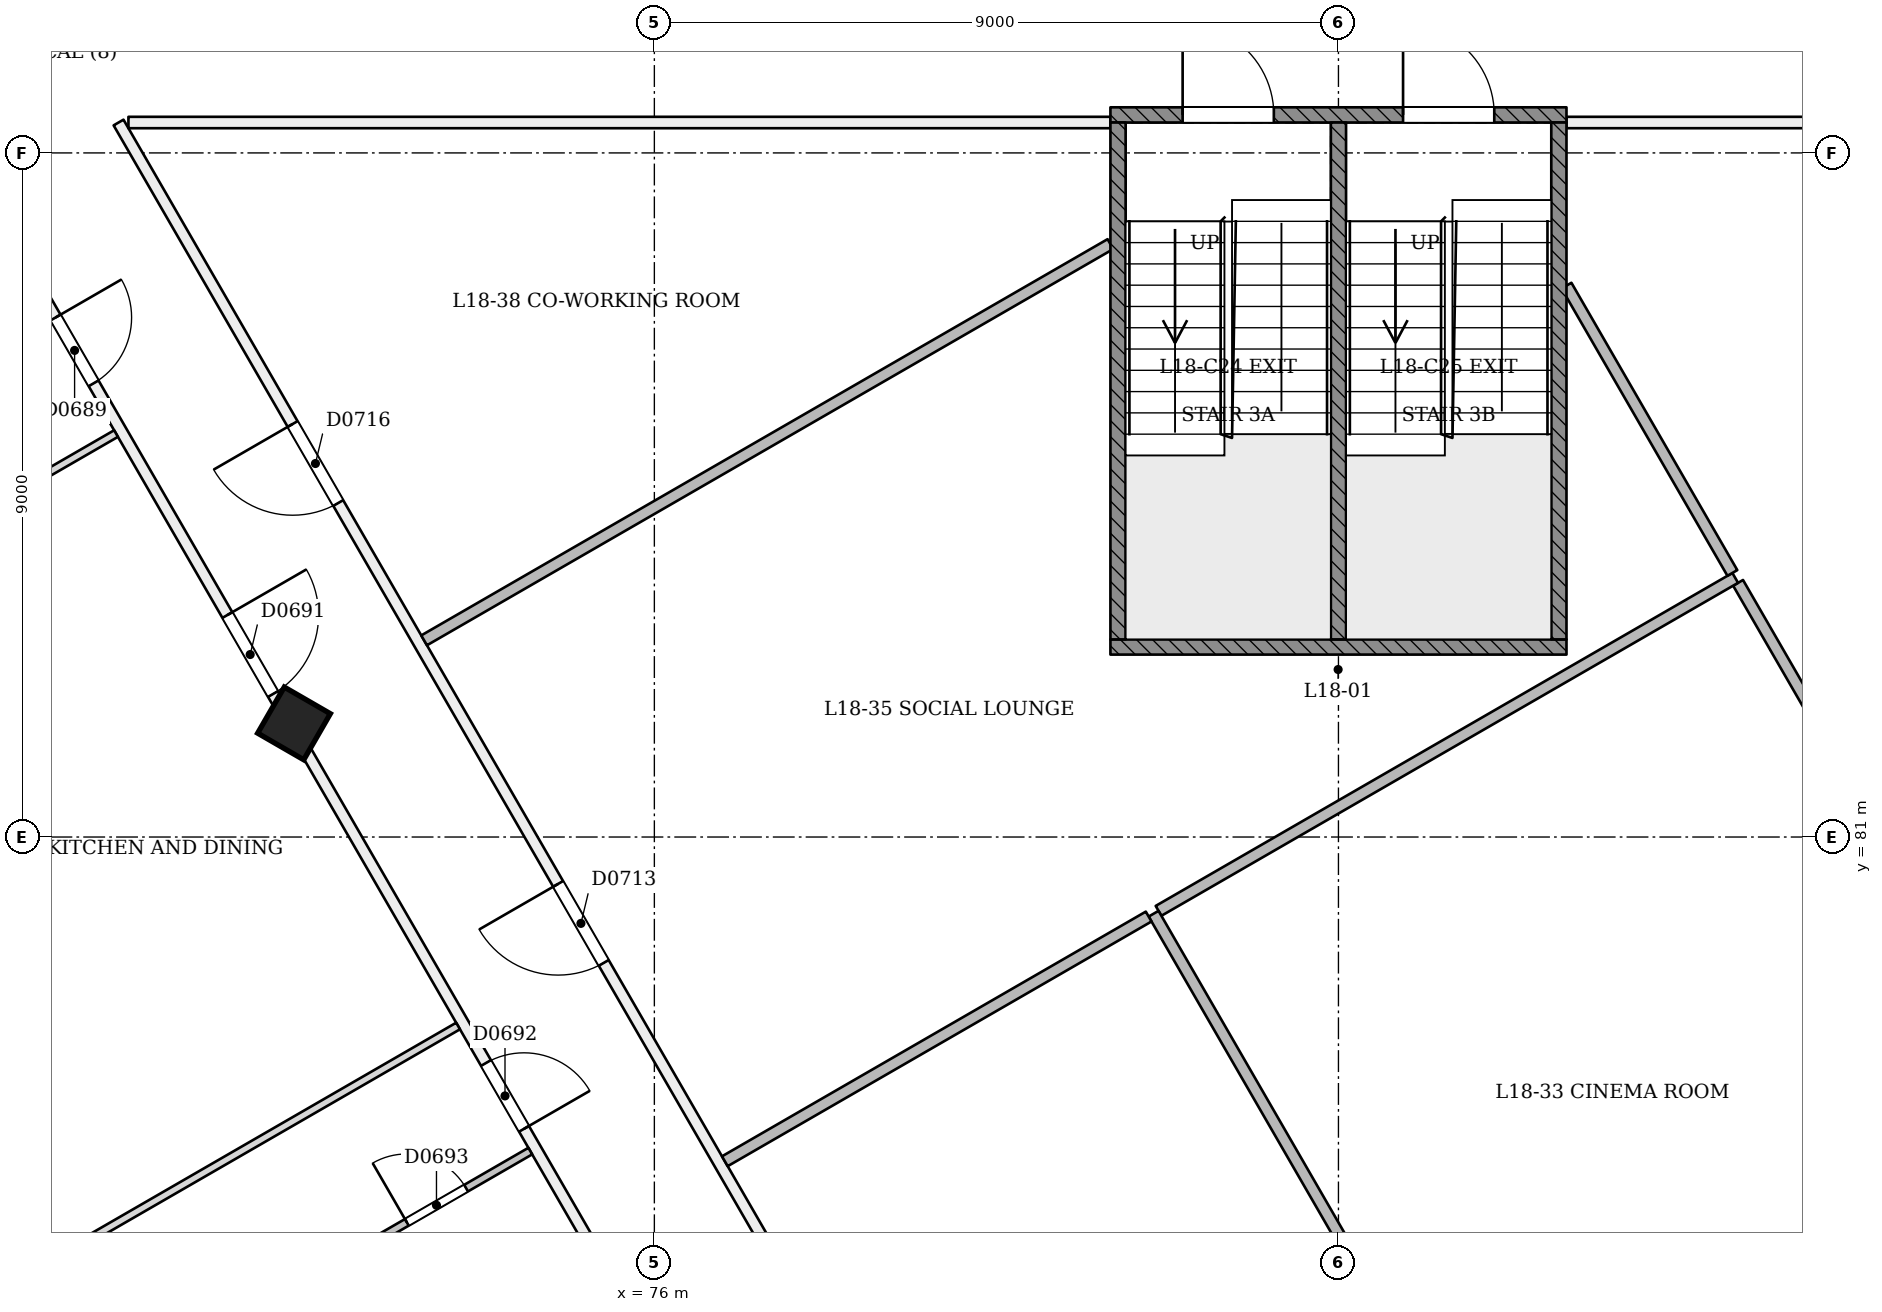
"""IFC4 building model, lengths in metres.
Left out: names, types, materials, properties, quantities, classifications, styles, units other than length and angle.
Written with IfcOpenShell. Run it as: python <this file> out.ifc"""

import sys

from ifc_helpers import new_model, si_unit, direction, frame, frame_2d, origin, origin_2d, place, context, subcontext, project, spatial, rectangle, extrude, element, fill, save


model = new_model("IFC4")
c1 = context("Model", 3, precision=1e-05, world=origin(), true_north=direction((0.0, 1.0)))
c2 = subcontext(c1, "Body", "Model", "MODEL_VIEW")
j1 = project(units=[si_unit("LENGTHUNIT", "METRE"), si_unit("PLANEANGLEUNIT", "RADIAN")], contexts=[c1])
p1 = place(None, origin())
s1 = spatial("IfcSite", under=j1, at=p1, CompositionType="ELEMENT")
p2 = place(p1, origin())
s2 = spatial("IfcBuilding", under=s1, at=p2, CompositionType="ELEMENT")
p3 = place(p2, frame((0.0, 0.0, 73.8)))
s3 = spatial("IfcBuildingStorey", under=s2, at=p3, CompositionType="ELEMENT", Elevation=73.8)
p4 = place(p3, frame((71.232, 82.448, -0.021), z_axis=(0.022222910879, 0.038415824599, 0.999014697916), x_axis=(-0.866021331072, -0.498527657424, 0.038434735731)))
e1 = element("IfcColumn", 1, at=p4, inside=s3, PredefinedType="COLUMN", context=c2, shape_type="SweptSolid", body=[
    extrude(rectangle(XDim=0.7, YDim=0.7, at=origin_2d()), origin(), (0.0, 0.0, 1.0), 3.604),
])
p5 = place(p3, frame((66.732, 90.242, 0.0), z_axis=(0.0, 0.0, 1.0), x_axis=(0.500004906105, -0.866022571225, 0.0)))
e2 = element("IfcWall", 2, at=p5, inside=s3, PredefinedType="PARTITIONING", context=c2, shape_type="SweptSolid", body=[
    extrude(rectangle(XDim=35.041, YDim=0.15, at=frame_2d((17.521, 0.0))), origin(), (0.0, 0.0, 1.0), 2.7),
])
p6 = place(p5, frame((2.78, 0.0, 0.0)))
e3 = element("IfcOpeningElement", 3, at=p6, cuts=e2, PredefinedType="OPENING", context=c2, shape_type="SweptSolid", body=[
    extrude(rectangle(XDim=1.0, YDim=2.1, at=frame_2d((0.5, 1.05))), frame((0.0, 0.085, 0.0), z_axis=(0.0, -1.0, 0.0), x_axis=(1.0, 0.0, 0.0)), (0.0, 0.0, 1.0), 0.171),
])
p7 = place(p5, frame((7.3, 0.0, 0.0)))
e4 = element("IfcOpeningElement", 4, at=p7, cuts=e2, PredefinedType="OPENING", context=c2, shape_type="SweptSolid", body=[
    extrude(rectangle(XDim=1.2, YDim=2.1, at=frame_2d((0.6, 1.05))), frame((0.0, 0.085, 0.0), z_axis=(0.0, -1.0, 0.0), x_axis=(1.0, 0.0, 0.0)), (0.0, 0.0, 1.0), 0.171),
])
p8 = place(p5, frame((14.105, 0.0, 0.0)))
e5 = element("IfcOpeningElement", 5, at=p8, cuts=e2, PredefinedType="OPENING", context=c2, shape_type="SweptSolid", body=[
    extrude(rectangle(XDim=1.0, YDim=2.1, at=frame_2d((0.5, 1.05))), frame((0.0, 0.085, 0.0), z_axis=(0.0, -1.0, 0.0), x_axis=(1.0, 0.0, 0.0)), (0.0, 0.0, 1.0), 0.171),
])
p9 = place(p5, frame((20.78, 0.0, 0.0)))
e6 = element("IfcOpeningElement", 6, at=p9, cuts=e2, PredefinedType="OPENING", context=c2, shape_type="SweptSolid", body=[
    extrude(rectangle(XDim=1.0, YDim=2.1, at=frame_2d((0.5, 1.05))), frame((0.0, 0.085, 0.0), z_axis=(0.0, -1.0, 0.0), x_axis=(1.0, 0.0, 0.0)), (0.0, 0.0, 1.0), 0.171),
])
p10 = place(p5, frame((24.25, 0.0, 0.0)))
e7 = element("IfcOpeningElement", 7, at=p10, cuts=e2, PredefinedType="OPENING", context=c2, shape_type="SweptSolid", body=[
    extrude(rectangle(XDim=1.0, YDim=2.1, at=frame_2d((0.5, 1.05))), frame((0.0, 0.085, 0.0), z_axis=(0.0, -1.0, 0.0), x_axis=(1.0, 0.0, 0.0)), (0.0, 0.0, 1.0), 0.171),
])
p11 = place(p5, frame((30.473, 0.0, 0.0)))
e8 = element("IfcOpeningElement", 8, at=p11, cuts=e2, PredefinedType="OPENING", context=c2, shape_type="SweptSolid", body=[
    extrude(rectangle(XDim=1.2, YDim=2.1, at=frame_2d((0.6, 1.05))), frame((0.0, 0.085, 0.0), z_axis=(0.0, -1.0, 0.0), x_axis=(1.0, 0.0, 0.0)), (0.0, 0.0, 1.0), 0.171),
])
p12 = place(p3, frame((85.747, 59.896, 0.0), z_axis=(0.0, 0.0, 1.0), x_axis=(0.500002549277, 0.866023931954, 0.0)))
e9 = element("IfcWall", 9, at=p12, inside=s3, PredefinedType="PARTITIONING", context=c2, shape_type="SweptSolid", body=[
    extrude(rectangle(XDim=43.082, YDim=0.15, at=frame_2d((21.541, 0.0))), origin(), (0.0, 0.0, 1.0), 2.7),
])
p13 = place(p12, frame((0.244, 0.0, 0.0)))
e10 = element("IfcOpeningElement", 10, at=p13, cuts=e9, PredefinedType="OPENING", context=c2, shape_type="SweptSolid", body=[
    extrude(rectangle(XDim=1.2, YDim=2.1, at=frame_2d((0.6, 1.05))), frame((0.0, 0.085, 0.0), z_axis=(0.0, -1.0, 0.0), x_axis=(1.0, 0.0, 0.0)), (0.0, 0.0, 1.0), 0.171),
])
p14 = place(p12, frame((4.146, 0.0, 0.0)))
e11 = element("IfcOpeningElement", 11, at=p14, cuts=e9, PredefinedType="OPENING", context=c2, shape_type="SweptSolid", body=[
    extrude(rectangle(XDim=1.0, YDim=2.1, at=frame_2d((0.5, 1.05))), frame((0.0, 0.085, 0.0), z_axis=(0.0, -1.0, 0.0), x_axis=(1.0, 0.0, 0.0)), (0.0, 0.0, 1.0), 0.171),
])
p15 = place(p12, frame((10.821, 0.0, 0.0)))
e12 = element("IfcOpeningElement", 12, at=p15, cuts=e9, PredefinedType="OPENING", context=c2, shape_type="SweptSolid", body=[
    extrude(rectangle(XDim=1.0, YDim=2.1, at=frame_2d((0.5, 1.05))), frame((0.0, 0.085, 0.0), z_axis=(0.0, -1.0, 0.0), x_axis=(1.0, 0.0, 0.0)), (0.0, 0.0, 1.0), 0.171),
])
p16 = place(p12, frame((13.262, 0.0, 0.0)))
e13 = element("IfcOpeningElement", 13, at=p16, cuts=e9, PredefinedType="OPENING", context=c2, shape_type="SweptSolid", body=[
    extrude(rectangle(XDim=1.0, YDim=2.1, at=frame_2d((0.5, 1.05))), frame((0.0, 0.085, 0.0), z_axis=(0.0, -1.0, 0.0), x_axis=(1.0, 0.0, 0.0)), (0.0, 0.0, 1.0), 0.171),
])
p17 = place(p12, frame((20.941, 0.0, 0.0)))
e14 = element("IfcOpeningElement", 14, at=p17, cuts=e9, PredefinedType="OPENING", context=c2, shape_type="SweptSolid", body=[
    extrude(rectangle(XDim=1.2, YDim=2.1, at=frame_2d((0.6, 1.05))), frame((0.0, 0.085, 0.0), z_axis=(0.0, -1.0, 0.0), x_axis=(1.0, 0.0, 0.0)), (0.0, 0.0, 1.0), 0.171),
])
p18 = place(p12, frame((28.821, 0.0, 0.0)))
e15 = element("IfcOpeningElement", 15, at=p18, cuts=e9, PredefinedType="OPENING", context=c2, shape_type="SweptSolid", body=[
    extrude(rectangle(XDim=1.0, YDim=2.1, at=frame_2d((0.5, 1.05))), frame((0.0, 0.085, 0.0), z_axis=(0.0, -1.0, 0.0), x_axis=(1.0, 0.0, 0.0)), (0.0, 0.0, 1.0), 0.171),
])
p19 = place(p12, frame((31.112, 0.0, 0.0)))
e16 = element("IfcOpeningElement", 16, at=p19, cuts=e9, PredefinedType="OPENING", context=c2, shape_type="SweptSolid", body=[
    extrude(rectangle(XDim=1.1, YDim=2.1, at=frame_2d((0.55, 1.05))), frame((0.0, 0.085, 0.0), z_axis=(0.0, -1.0, 0.0), x_axis=(1.0, 0.0, 0.0)), (0.0, 0.0, 1.0), 0.171),
])
p20 = place(p12, frame((38.514, 0.0, 0.0)))
e17 = element("IfcOpeningElement", 17, at=p20, cuts=e9, PredefinedType="OPENING", context=c2, shape_type="SweptSolid", body=[
    extrude(rectangle(XDim=1.2, YDim=2.1, at=frame_2d((0.6, 1.05))), frame((0.0, 0.085, 0.0), z_axis=(0.0, -1.0, 0.0), x_axis=(1.0, 0.0, 0.0)), (0.0, 0.0, 1.0), 0.171),
])
p21 = place(p3, frame((101.049, 90.4, 0.0), z_axis=(0.0, 0.0, 1.0), x_axis=(-0.500000325473, -0.866025215872, 0.0)))
e18 = element("IfcWall", 18, at=p21, inside=s3, PredefinedType="PARTITIONING", context=c2, shape_type="SweptSolid", body=[
    extrude(rectangle(XDim=31.968, YDim=0.15, at=frame_2d((15.984, 0.0))), origin(), (0.0, 0.0, 1.0), 3.1),
])
p22 = place(p21, frame((16.691, 0.0, 0.0)))
e19 = element("IfcOpeningElement", 19, at=p22, cuts=e18, PredefinedType="OPENING", context=c2, shape_type="SweptSolid", body=[
    extrude(rectangle(XDim=1.2, YDim=2.1, at=frame_2d((0.6, 1.05))), frame((0.0, 0.085, 0.0), z_axis=(0.0, -1.0, 0.0), x_axis=(1.0, 0.0, 0.0)), (0.0, 0.0, 1.0), 0.171),
])
p23 = place(p21, frame((6.541, 0.0, 0.0)))
e20 = element("IfcOpeningElement", 20, at=p23, cuts=e18, PredefinedType="OPENING", context=c2, shape_type="SweptSolid", body=[
    extrude(rectangle(XDim=1.2, YDim=2.1, at=frame_2d((0.6, 1.05))), frame((0.0, 0.085, 0.0), z_axis=(0.0, -1.0, 0.0), x_axis=(1.0, 0.0, 0.0)), (0.0, 0.0, 1.0), 0.171),
])
p24 = place(p3, frame((88.0, 90.4, 0.0), z_axis=(0.0, 0.0, 1.0), x_axis=(1.0, 0.0, 0.0)))
e21 = element("IfcWall", 21, at=p24, inside=s3, PredefinedType="PARTITIONING", context=c2, shape_type="SweptSolid", body=[
    extrude(rectangle(XDim=12.919, YDim=0.15, at=frame_2d((6.459, 0.0))), origin(), (0.0, 0.0, 1.0), 3.1),
])
p25 = place(p3, frame((85.0, 62.602, 0.0), z_axis=(0.0, 0.0, 1.0), x_axis=(-0.500002713669, 0.866023837041, 0.0)))
e22 = element("IfcWall", 22, at=p25, inside=s3, PredefinedType="PARTITIONING", context=c2, shape_type="SweptSolid", body=[
    extrude(rectangle(XDim=32.098, YDim=0.15, at=frame_2d((16.049, 0.0))), origin(), (0.0, 0.0, 1.0), 3.1),
])
p26 = place(p25, frame((19.332, 0.0, 0.0)))
e23 = element("IfcOpeningElement", 23, at=p26, cuts=e22, PredefinedType="OPENING", context=c2, shape_type="SweptSolid", body=[
    extrude(rectangle(XDim=1.2, YDim=2.1, at=frame_2d((0.6, 1.05))), frame((0.0, 0.085, 0.0), z_axis=(0.0, -1.0, 0.0), x_axis=(1.0, 0.0, 0.0)), (0.0, 0.0, 1.0), 0.171),
])
p27 = place(p25, frame((10.898, 0.0, 0.0)))
e24 = element("IfcOpeningElement", 24, at=p27, cuts=e22, PredefinedType="OPENING", context=c2, shape_type="SweptSolid", body=[
    extrude(rectangle(XDim=1.2, YDim=2.1, at=frame_2d((0.6, 1.05))), frame((0.0, 0.085, 0.0), z_axis=(0.0, -1.0, 0.0), x_axis=(1.0, 0.0, 0.0)), (0.0, 0.0, 1.0), 0.171),
])
p28 = place(p25, frame((26.318, 0.0, 0.0)))
e25 = element("IfcOpeningElement", 25, at=p28, cuts=e22, PredefinedType="OPENING", context=c2, shape_type="SweptSolid", body=[
    extrude(rectangle(XDim=1.2, YDim=2.1, at=frame_2d((0.6, 1.05))), frame((0.0, 0.085, 0.0), z_axis=(0.0, -1.0, 0.0), x_axis=(1.0, 0.0, 0.0)), (0.0, 0.0, 1.0), 0.171),
])
p29 = place(p25, frame((3.686, 0.0, 0.0)))
e26 = element("IfcOpeningElement", 26, at=p29, cuts=e22, PredefinedType="OPENING", context=c2, shape_type="SweptSolid", body=[
    extrude(rectangle(XDim=1.0, YDim=2.1, at=frame_2d((0.5, 1.05))), frame((0.0, 0.085, 0.0), z_axis=(0.0, -1.0, 0.0), x_axis=(1.0, 0.0, 0.0)), (0.0, 0.0, 1.0), 0.171),
])
p30 = place(p3, frame((69.081, 90.4, 0.0), z_axis=(0.0, 0.0, 1.0), x_axis=(1.0, 0.0, 0.0)))
e27 = element("IfcWall", 27, at=p30, inside=s3, PredefinedType="PARTITIONING", context=c2, shape_type="SweptSolid", body=[
    extrude(rectangle(XDim=12.919, YDim=0.15, at=frame_2d((6.459, 0.0))), origin(), (0.0, 0.0, 1.0), 3.1),
])
for number, where, z_axis, x_axis in (
    (28, (63.422, 83.135, 0.0), (0.0, 0.0, 1.0), (0.866, 0.5, 0.0)),
    (29, (67.922, 75.341, 0.0), (0.0, 0.0, 1.0), (0.866, 0.5, 0.0)),
):
    element("IfcWall", number, at=place(p3, frame(where, z_axis=z_axis, x_axis=x_axis)), inside=s3, PredefinedType="PARTITIONING", context=c2, shape_type="SweptSolid", body=[
        extrude(rectangle(XDim=6.345, YDim=0.1, at=frame_2d((3.173, 0.0))), origin(), (0.0, 0.0, 1.0), 2.6),
    ])
p31 = place(p3, frame((71.834, 75.406, 0.0), z_axis=(0.0, 0.0, 1.0), x_axis=(0.866025730634, 0.499999433879, 0.0)))
e30 = element("IfcWall", 30, at=p31, inside=s3, PredefinedType="PARTITIONING", context=c2, shape_type="SweptSolid", body=[
    extrude(rectangle(XDim=2.925, YDim=0.1, at=frame_2d((1.462, 0.0))), origin(), (0.0, 0.0, 1.0), 3.1),
])
p32 = place(p31, frame((1.05, 0.0, 0.0)))
e31 = element("IfcOpeningElement", 31, at=p32, cuts=e30, PredefinedType="OPENING", context=c2, shape_type="SweptSolid", body=[
    extrude(rectangle(XDim=0.9, YDim=2.1, at=frame_2d((0.45, 1.05))), frame((0.0, 0.061, 0.0), z_axis=(0.0, -1.0, 0.0), x_axis=(1.0, 0.0, 0.0)), (0.0, 0.0, 1.0), 0.121),
])
p33 = place(p3, frame((93.84, 78.139, 0.0), z_axis=(0.0, 0.0, 1.0), x_axis=(-0.500001675373, 0.866024436505, 0.0)))
e32 = element("IfcWall", 32, at=p33, inside=s3, PredefinedType="PARTITIONING", context=c2, shape_type="SweptSolid", body=[
    extrude(rectangle(XDim=7.165, YDim=0.15, at=frame_2d((3.583, 0.0))), origin(), (0.0, 0.0, 1.0), 3.1),
])
p34 = place(p3, frame((90.22, 84.409, 0.0), z_axis=(0.0, 0.0, 1.0), x_axis=(-0.866022229689, -0.500005497654, 0.0)))
e33 = element("IfcWall", 33, at=p34, inside=s3, PredefinedType="PARTITIONING", context=c2, shape_type="SweptSolid", body=[
    extrude(rectangle(XDim=8.761, YDim=0.15, at=frame_2d((4.38, 0.0))), origin(), (0.0, 0.0, 1.0), 3.1),
])
p35 = place(p3, frame((82.568, 79.991, 0.0), z_axis=(0.0, 0.0, 1.0), x_axis=(0.499987872132, -0.866032405699, 0.0)))
e34 = element("IfcWall", 34, at=p35, inside=s3, PredefinedType="PARTITIONING", context=c2, shape_type="SweptSolid", body=[
    extrude(rectangle(XDim=12.342, YDim=0.15, at=frame_2d((6.171, 0.0))), origin(), (0.0, 0.0, 1.0), 3.1),
])
p36 = place(p3, frame((88.0, 88.254, 0.0), z_axis=(0.0, 0.0, 1.0), x_axis=(0.500012937857, -0.86601793398, 0.0)))
e35 = element("IfcWall", 35, at=p36, inside=s3, PredefinedType="PARTITIONING", context=c2, shape_type="SweptSolid", body=[
    extrude(rectangle(XDim=4.365, YDim=0.15, at=frame_2d((2.183, 0.0))), origin(), (0.0, 0.0, 1.0), 3.1),
])
p37 = place(p3, frame((76.927, 76.734, 0.0), z_axis=(0.0, 0.0, 1.0), x_axis=(0.866027091653, 0.499997076515, 0.0)))
e36 = element("IfcWall", 36, at=p37, inside=s3, PredefinedType="PARTITIONING", context=c2, shape_type="SweptSolid", body=[
    extrude(rectangle(XDim=6.438, YDim=0.15, at=frame_2d((3.219, 0.0))), origin(), (0.0, 0.0, 1.0), 3.1),
])
p38 = place(p3, frame((82.0, 88.8, 0.0), z_axis=(0.0, 0.0, 1.0), x_axis=(-0.866026874108, -0.499997453315, 0.0)))
e37 = element("IfcWall", 37, at=p38, inside=s3, PredefinedType="PARTITIONING", context=c2, shape_type="SweptSolid", body=[
    extrude(rectangle(XDim=10.426, YDim=0.15, at=frame_2d((5.213, 0.0))), origin(), (0.0, 0.0, 1.0), 3.1),
])
p39 = place(p3, frame((82.0, 90.5, 0.0), z_axis=(0.0, 0.0, 1.0), x_axis=(1.0, 0.0, 0.0)))
e38 = element("IfcWall", 38, at=p39, inside=s3, PredefinedType="SOLIDWALL", context=c2, shape_type="SweptSolid", body=[
    extrude(rectangle(XDim=6.0, YDim=0.2, at=frame_2d((3.0, 0.0))), origin(), (0.0, 0.0, 1.0), 3.1),
])
p40 = place(p39, frame((0.95, 0.0, 0.0)))
e39 = element("IfcOpeningElement", 39, at=p40, cuts=e38, PredefinedType="OPENING", context=c2, shape_type="SweptSolid", body=[
    extrude(rectangle(XDim=1.2, YDim=2.1, at=frame_2d((0.6, 1.05))), frame((0.0, 0.11, 0.0), z_axis=(0.0, -1.0, 0.0), x_axis=(1.0, 0.0, 0.0)), (0.0, 0.0, 1.0), 0.221),
])
p41 = place(p39, frame((3.85, 0.0, 0.0)))
e40 = element("IfcOpeningElement", 40, at=p41, cuts=e38, PredefinedType="OPENING", context=c2, shape_type="SweptSolid", body=[
    extrude(rectangle(XDim=1.2, YDim=2.1, at=frame_2d((0.6, 1.05))), frame((0.0, 0.11, 0.0), z_axis=(0.0, -1.0, 0.0), x_axis=(1.0, 0.0, 0.0)), (0.0, 0.0, 1.0), 0.221),
])
p42 = place(p3, frame((82.0, 83.5, 0.0), z_axis=(0.0, 0.0, 1.0), x_axis=(1.0, 0.0, 0.0)))
e41 = element("IfcWall", 41, at=p42, inside=s3, PredefinedType="SOLIDWALL", context=c2, shape_type="SweptSolid", body=[
    extrude(rectangle(XDim=6.0, YDim=0.2, at=frame_2d((3.0, 0.0))), origin(), (0.0, 0.0, 1.0), 3.1),
])
for number, where, z_axis, x_axis in (
    (42, (82.1, 83.6, 0.0), (0.0, 0.0, 1.0), (0.0, 1.0, 0.0)),
    (43, (87.9, 83.6, 0.0), (0.0, 0.0, 1.0), (0.0, 1.0, 0.0)),
    (44, (85.0, 83.6, 0.0), (0.0, 0.0, 1.0), (0.0, 1.0, 0.0)),
):
    element("IfcWall", number, at=place(p3, frame(where, z_axis=z_axis, x_axis=x_axis)), inside=s3, PredefinedType="SOLIDWALL", context=c2, shape_type="SweptSolid", body=[
        extrude(rectangle(XDim=6.8, YDim=0.2, at=frame_2d((3.4, 0.0))), origin(), (0.0, 0.0, 1.0), 3.1),
    ])
p43 = place(p6, origin())
e45 = element("IfcDoor", 45, at=p43, inside=s3, OperationType="SINGLE_SWING_LEFT", PredefinedType="NOTDEFINED", context=c2, shape_type="SweptSolid", body=[
    extrude(rectangle(XDim=1.0, YDim=2.1, at=frame_2d((0.5, 1.05))), frame((0.0, 0.025, 0.0), z_axis=(0.0, -1.0, 0.0), x_axis=(1.0, 0.0, 0.0)), (0.0, 0.0, 1.0), 0.05),
])
fill(e3, e45)
p44 = place(p7, origin())
e46 = element("IfcDoor", 46, at=p44, inside=s3, OperationType="SINGLE_SWING_LEFT", PredefinedType="NOTDEFINED", context=c2, shape_type="SweptSolid", body=[
    extrude(rectangle(XDim=1.2, YDim=2.1, at=frame_2d((0.6, 1.05))), frame((0.0, 0.025, 0.0), z_axis=(0.0, -1.0, 0.0), x_axis=(1.0, 0.0, 0.0)), (0.0, 0.0, 1.0), 0.05),
])
fill(e4, e46)
p45 = place(p8, origin())
e47 = element("IfcDoor", 47, at=p45, inside=s3, OperationType="SINGLE_SWING_RIGHT", PredefinedType="NOTDEFINED", context=c2, shape_type="SweptSolid", body=[
    extrude(rectangle(XDim=1.0, YDim=2.1, at=frame_2d((0.5, 1.05))), frame((0.0, 0.025, 0.0), z_axis=(0.0, -1.0, 0.0), x_axis=(1.0, 0.0, 0.0)), (0.0, 0.0, 1.0), 0.05),
])
fill(e5, e47)
p46 = place(p32, origin())
e48 = element("IfcDoor", 48, at=p46, inside=s3, OperationType="SINGLE_SWING_LEFT", PredefinedType="NOTDEFINED", context=c2, shape_type="SweptSolid", body=[
    extrude(rectangle(XDim=0.9, YDim=2.1, at=frame_2d((0.45, 1.05))), frame((0.0, 0.025, 0.0), z_axis=(0.0, -1.0, 0.0), x_axis=(1.0, 0.0, 0.0)), (0.0, 0.0, 1.0), 0.05),
])
fill(e31, e48)
p47 = place(p26, origin())
e49 = element("IfcDoor", 49, at=p47, inside=s3, OperationType="SINGLE_SWING_RIGHT", PredefinedType="NOTDEFINED", context=c2, shape_type="SweptSolid", body=[
    extrude(rectangle(XDim=1.2, YDim=2.1, at=frame_2d((0.6, 1.05))), frame((0.0, 0.025, 0.0), z_axis=(0.0, -1.0, 0.0), x_axis=(1.0, 0.0, 0.0)), (0.0, 0.0, 1.0), 0.05),
])
fill(e23, e49)
p48 = place(p28, origin())
e50 = element("IfcDoor", 50, at=p48, inside=s3, OperationType="SINGLE_SWING_RIGHT", PredefinedType="NOTDEFINED", context=c2, shape_type="SweptSolid", body=[
    extrude(rectangle(XDim=1.2, YDim=2.1, at=frame_2d((0.6, 1.05))), frame((0.0, 0.025, 0.0), z_axis=(0.0, -1.0, 0.0), x_axis=(1.0, 0.0, 0.0)), (0.0, 0.0, 1.0), 0.05),
])
fill(e25, e50)
p49 = place(p40, origin())
e51 = element("IfcDoor", 51, at=p49, inside=s3, OperationType="SINGLE_SWING_LEFT", PredefinedType="NOTDEFINED", context=c2, shape_type="SweptSolid", body=[
    extrude(rectangle(XDim=1.2, YDim=2.1, at=frame_2d((0.6, 1.05))), frame((0.0, 0.025, 0.0), z_axis=(0.0, -1.0, 0.0), x_axis=(1.0, 0.0, 0.0)), (0.0, 0.0, 1.0), 0.05),
])
fill(e39, e51)
p50 = place(p41, origin())
e52 = element("IfcDoor", 52, at=p50, inside=s3, OperationType="SINGLE_SWING_LEFT", PredefinedType="NOTDEFINED", context=c2, shape_type="SweptSolid", body=[
    extrude(rectangle(XDim=1.2, YDim=2.1, at=frame_2d((0.6, 1.05))), frame((0.0, 0.025, 0.0), z_axis=(0.0, -1.0, 0.0), x_axis=(1.0, 0.0, 0.0)), (0.0, 0.0, 1.0), 0.05),
])
fill(e40, e52)
save(model, sys.argv[1])
